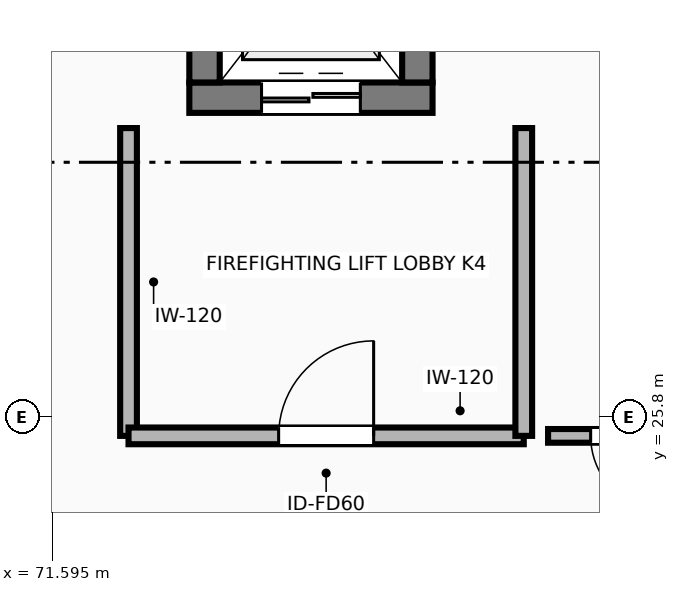
"""IFC4 building model, lengths in metres.
Left out: names, types, materials, properties, quantities, classifications, styles, units other than length and angle.
Written with IfcOpenShell. Run it as: python <this file> out.ifc"""

import sys

from ifc_helpers import new_model, si_unit, direction, frame, frame_2d, origin, place, context, subcontext, project, spatial, rectangle, extrude, element, fill, save


model = new_model("IFC4")
c1 = context("Model", 3, precision=1e-05, world=origin(), true_north=direction((0.0, 1.0)))
c2 = subcontext(c1, "Body", "Model", "MODEL_VIEW")
j1 = project(units=[si_unit("LENGTHUNIT", "METRE"), si_unit("PLANEANGLEUNIT", "RADIAN")], contexts=[c1])
p1 = place(None, origin())
s1 = spatial("IfcSite", under=j1, at=p1, CompositionType="ELEMENT")
p2 = place(p1, origin())
s2 = spatial("IfcBuilding", under=s1, at=p2, CompositionType="ELEMENT")
p3 = place(p2, frame((0.0, 0.0, 5.4)))
s3 = spatial("IfcBuildingStorey", under=s2, at=p3, CompositionType="ELEMENT", Elevation=5.4)
p4 = place(p3, frame((73.4, 30.0, 0.0), z_axis=(0.0, 0.0, 1.0), x_axis=(1.0, 0.0, 0.0)))
e1 = element("IfcWall", 1, at=p4, inside=s3, PredefinedType="SHEAR", context=c2, shape_type="SweptSolid", body=[
    extrude(rectangle(XDim=3.2, YDim=0.4, at=frame_2d((1.6, 0.0))), origin(), (0.0, 0.0, 1.0), 4.2),
])
p5 = place(p4, frame((0.95, 0.0, 0.0)))
e2 = element("IfcOpeningElement", 2, at=p5, cuts=e1, PredefinedType="OPENING", context=c2, shape_type="SweptSolid", body=[
    extrude(rectangle(XDim=1.3, YDim=2.25, at=frame_2d((0.65, 1.125))), frame((0.0, 0.21, 0.0), z_axis=(0.0, -1.0, 0.0), x_axis=(1.0, 0.0, 0.0)), (0.0, 0.0, 1.0), 0.42),
])
for number, where, z_axis, x_axis in (
    (3, (73.6, 30.2, 0.0), (0.0, 0.0, 1.0), (0.0, 1.0, 0.0)),
    (4, (76.4, 33.3, 0.0), (0.0, 0.0, 1.0), (0.0, -1.0, 0.0)),
):
    element("IfcWall", number, at=place(p3, frame(where, z_axis=z_axis, x_axis=x_axis)), inside=s3, PredefinedType="SHEAR", context=c2, shape_type="SweptSolid", body=[
        extrude(rectangle(XDim=3.1, YDim=0.4, at=frame_2d((1.55, 0.0))), origin(), (0.0, 0.0, 1.0), 4.2),
    ])
p6 = place(p3, frame((72.6, 29.6, 0.0), z_axis=(0.0, 0.0, 1.0), x_axis=(0.0, -1.0, 0.0)))
e5 = element("IfcWall", 5, at=p6, inside=s3, PredefinedType="PARTITIONING", context=c2, shape_type="SweptSolid", body=[
    extrude(rectangle(XDim=4.05, YDim=0.22, at=frame_2d((2.025, 0.0))), origin(), (0.0, 0.0, 1.0), 3.92),
])
p7 = place(p3, frame((72.6, 25.55, 0.0), z_axis=(0.0, 0.0, 1.0), x_axis=(1.0, 0.0, 0.0)))
e6 = element("IfcWall", 6, at=p7, inside=s3, PredefinedType="PARTITIONING", context=c2, shape_type="SweptSolid", body=[
    extrude(rectangle(XDim=5.2, YDim=0.22, at=frame_2d((2.6, 0.0))), origin(), (0.0, 0.0, 1.0), 3.225),
])
p8 = place(p7, frame((1.975, 0.0, 0.0)))
e7 = element("IfcOpeningElement", 7, at=p8, cuts=e6, PredefinedType="OPENING", context=c2, shape_type="SweptSolid", body=[
    extrude(rectangle(XDim=1.25, YDim=2.2, at=frame_2d((0.625, 1.1))), frame((0.0, 0.12, 0.0), z_axis=(0.0, -1.0, 0.0), x_axis=(1.0, 0.0, 0.0)), (0.0, 0.0, 1.0), 0.24),
])
p9 = place(p3, frame((77.8, 25.55, 0.0), z_axis=(0.0, 0.0, 1.0), x_axis=(0.0, 1.0, 0.0)))
e8 = element("IfcWall", 8, at=p9, inside=s3, PredefinedType="PARTITIONING", context=c2, shape_type="SweptSolid", body=[
    extrude(rectangle(XDim=4.05, YDim=0.22, at=frame_2d((2.025, 0.0))), origin(), (0.0, 0.0, 1.0), 3.588),
])
p10 = place(p3, frame((80.24, 25.55, 0.0), z_axis=(0.0, 0.0, 1.0), x_axis=(-1.0, 0.0, 0.0)))
e9 = element("IfcWall", 9, at=p10, inside=s3, PredefinedType="PARTITIONING", context=c2, shape_type="SweptSolid", body=[
    extrude(rectangle(XDim=2.12, YDim=0.18, at=frame_2d((1.06, 0.0))), origin(), (0.0, 0.0, 1.0), 3.225),
])
p11 = place(p10, frame((0.56, 0.0, 0.0)))
e10 = element("IfcOpeningElement", 10, at=p11, cuts=e9, PredefinedType="OPENING", context=c2, shape_type="SweptSolid", body=[
    extrude(rectangle(XDim=1.0, YDim=2.15, at=frame_2d((0.5, 1.075))), frame((0.0, 0.1, 0.0), z_axis=(0.0, -1.0, 0.0), x_axis=(1.0, 0.0, 0.0)), (0.0, 0.0, 1.0), 0.2),
])
p12 = place(p5, origin())
e11 = element("IfcDoor", 11, at=p12, inside=s3, OperationType="DOUBLE_DOOR_SLIDING", PredefinedType="DOOR", context=c2, shape_type="SweptSolid", body=[
    extrude(rectangle(XDim=1.3, YDim=2.25, at=frame_2d((0.65, 1.125))), frame((0.0, 0.025, 0.0), z_axis=(0.0, -1.0, 0.0), x_axis=(1.0, 0.0, 0.0)), (0.0, 0.0, 1.0), 0.05),
])
fill(e2, e11)
p13 = place(p8, origin())
e12 = element("IfcDoor", 12, at=p13, inside=s3, OperationType="SINGLE_SWING_RIGHT", PredefinedType="DOOR", context=c2, shape_type="SweptSolid", body=[
    extrude(rectangle(XDim=1.25, YDim=2.2, at=frame_2d((0.625, 1.1))), frame((0.0, 0.025, 0.0), z_axis=(0.0, -1.0, 0.0), x_axis=(1.0, 0.0, 0.0)), (0.0, 0.0, 1.0), 0.05),
])
fill(e7, e12)
p14 = place(p11, origin())
e13 = element("IfcDoor", 13, at=p14, inside=s3, OperationType="SINGLE_SWING_LEFT", PredefinedType="DOOR", context=c2, shape_type="SweptSolid", body=[
    extrude(rectangle(XDim=1.0, YDim=2.15, at=frame_2d((0.5, 1.075))), frame((0.0, 0.025, 0.0), z_axis=(0.0, -1.0, 0.0), x_axis=(1.0, 0.0, 0.0)), (0.0, 0.0, 1.0), 0.05),
])
fill(e10, e13)
save(model, sys.argv[1])
